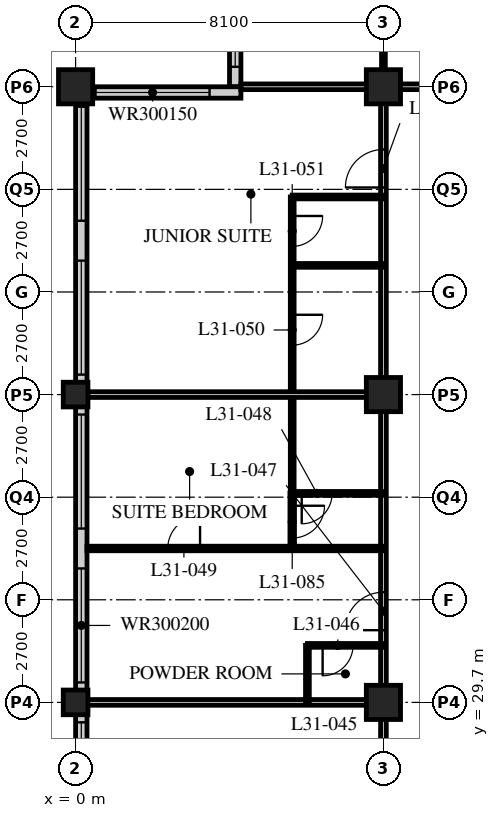
"""IFC4 building model, lengths in metres.
Left out: names, types, materials, properties, quantities, classifications, styles, units other than length and angle.
Written with IfcOpenShell. Run it as: python <this file> out.ifc"""

import sys

from ifc_helpers import new_model, si_unit, direction, frame, frame_2d, origin, origin_2d, place, context, subcontext, project, spatial, rectangle, hollow_rectangle, extrude, element, fill, save


model = new_model("IFC4")
c1 = context("Model", 3, precision=1e-05, world=origin(), true_north=direction((0.0, 1.0)))
c2 = subcontext(c1, "Body", "Model", "MODEL_VIEW")
j1 = project(units=[si_unit("LENGTHUNIT", "METRE"), si_unit("PLANEANGLEUNIT", "RADIAN")], contexts=[c1])
p1 = place(None, origin())
s1 = spatial("IfcSite", under=j1, at=p1, CompositionType="ELEMENT")
p2 = place(p1, origin())
s2 = spatial("IfcBuilding", under=s1, at=p2, CompositionType="ELEMENT")
p3 = place(p2, frame((0.0, 0.0, 123.8)))
s3 = spatial("IfcBuildingStorey", under=s2, at=p3, CompositionType="ELEMENT", Elevation=123.8)
for number, where, z_axis, x_axis in (
    (1, (0.0, 29.7, 0.0), (0.0, 0.0, 1.0), (1.0, 0.0, 0.0)),
    (2, (0.0, 37.8, 0.0), (0.0, 0.0, 1.0), (1.0, 0.0, 0.0)),
):
    element("IfcColumn", number, at=place(p3, frame(where, z_axis=z_axis, x_axis=x_axis)), inside=s3, PredefinedType="COLUMN", context=c2, shape_type="SweptSolid", body=[
        extrude(hollow_rectangle(XDim=0.65, YDim=0.65, WallThickness=0.055, at=origin_2d()), origin(), (0.0, 0.0, 1.0), 3.4),
    ])
for number, where, z_axis, x_axis in (
    (3, (0.0, 45.9, 0.0), (0.0, 0.0, 1.0), (1.0, 0.0, 0.0)),
    (4, (8.1, 29.7, 0.0), (0.0, 0.0, 1.0), (1.0, 0.0, 0.0)),
    (5, (8.1, 37.8, 0.0), (0.0, 0.0, 1.0), (1.0, 0.0, 0.0)),
    (6, (8.1, 45.9, 0.0), (0.0, 0.0, 1.0), (1.0, 0.0, 0.0)),
):
    element("IfcColumn", number, at=place(p3, frame(where, z_axis=z_axis, x_axis=x_axis)), inside=s3, PredefinedType="COLUMN", context=c2, shape_type="SweptSolid", body=[
        extrude(hollow_rectangle(XDim=0.9, YDim=0.9, WallThickness=0.09, at=origin_2d()), origin(), (0.0, 0.0, 1.0), 3.4),
    ])
p4 = place(p3, frame((4.2, 49.65, 0.0), z_axis=(0.0, 0.0, 1.0), x_axis=(0.0, -1.0, 0.0)))
e7 = element("IfcWall", 7, at=p4, inside=s3, PredefinedType="SOLIDWALL", context=c2, shape_type="SweptSolid", body=[
    extrude(rectangle(XDim=3.75, YDim=0.3, at=frame_2d((1.875, 0.0))), origin(), (0.0, 0.0, 1.0), 3.19),
])
p5 = place(p4, frame((0.225, 0.0, 0.9)))
e8 = element("IfcOpeningElement", 8, at=p5, cuts=e7, PredefinedType="OPENING", context=c2, shape_type="SweptSolid", body=[
    extrude(rectangle(XDim=3.0, YDim=1.5, at=frame_2d((1.5, 0.75))), frame((0.0, 0.16, 0.0), z_axis=(0.0, -1.0, 0.0), x_axis=(1.0, 0.0, 0.0)), (0.0, 0.0, 1.0), 0.32),
])
p6 = place(p3, frame((4.35, 45.75, 0.0), z_axis=(0.0, 0.0, 1.0), x_axis=(-1.0, 0.0, 0.0)))
e9 = element("IfcWall", 9, at=p6, inside=s3, PredefinedType="SOLIDWALL", context=c2, shape_type="SweptSolid", body=[
    extrude(rectangle(XDim=4.35, YDim=0.3, at=frame_2d((2.175, 0.0))), origin(), (0.0, 0.0, 1.0), 3.19),
])
p7 = place(p6, frame((0.825, 0.0, 0.9)))
e10 = element("IfcOpeningElement", 10, at=p7, cuts=e9, PredefinedType="OPENING", context=c2, shape_type="SweptSolid", body=[
    extrude(rectangle(XDim=3.0, YDim=1.5, at=frame_2d((1.5, 0.75))), frame((0.0, 0.16, 0.0), z_axis=(0.0, -1.0, 0.0), x_axis=(1.0, 0.0, 0.0)), (0.0, 0.0, 1.0), 0.32),
])
p8 = place(p3, frame((0.15, 45.6, 0.0), z_axis=(0.0, 0.0, 1.0), x_axis=(0.0, -1.0, 0.0)))
e11 = element("IfcWall", 11, at=p8, inside=s3, PredefinedType="SOLIDWALL", context=c2, shape_type="SweptSolid", body=[
    extrude(rectangle(XDim=32.1, YDim=0.3, at=frame_2d((16.05, 0.0))), origin(), (0.0, 0.0, 1.0), 3.19),
])
p9 = place(p8, frame((0.225, 0.0, 0.9)))
e12 = element("IfcOpeningElement", 12, at=p9, cuts=e11, PredefinedType="OPENING", context=c2, shape_type="SweptSolid", body=[
    extrude(rectangle(XDim=3.0, YDim=2.0, at=frame_2d((1.5, 1.0))), frame((0.0, 0.16, 0.0), z_axis=(0.0, -1.0, 0.0), x_axis=(1.0, 0.0, 0.0)), (0.0, 0.0, 1.0), 0.32),
])
p10 = place(p8, frame((4.275, 0.0, 0.9)))
e13 = element("IfcOpeningElement", 13, at=p10, cuts=e11, PredefinedType="OPENING", context=c2, shape_type="SweptSolid", body=[
    extrude(rectangle(XDim=3.0, YDim=2.0, at=frame_2d((1.5, 1.0))), frame((0.0, 0.16, 0.0), z_axis=(0.0, -1.0, 0.0), x_axis=(1.0, 0.0, 0.0)), (0.0, 0.0, 1.0), 0.32),
])
p11 = place(p8, frame((8.325, 0.0, 0.9)))
e14 = element("IfcOpeningElement", 14, at=p11, cuts=e11, PredefinedType="OPENING", context=c2, shape_type="SweptSolid", body=[
    extrude(rectangle(XDim=3.0, YDim=2.0, at=frame_2d((1.5, 1.0))), frame((0.0, 0.16, 0.0), z_axis=(0.0, -1.0, 0.0), x_axis=(1.0, 0.0, 0.0)), (0.0, 0.0, 1.0), 0.32),
])
p12 = place(p8, frame((12.375, 0.0, 0.9)))
e15 = element("IfcOpeningElement", 15, at=p12, cuts=e11, PredefinedType="OPENING", context=c2, shape_type="SweptSolid", body=[
    extrude(rectangle(XDim=3.0, YDim=2.0, at=frame_2d((1.5, 1.0))), frame((0.0, 0.16, 0.0), z_axis=(0.0, -1.0, 0.0), x_axis=(1.0, 0.0, 0.0)), (0.0, 0.0, 1.0), 0.32),
])
p13 = place(p8, frame((16.425, 0.0, 0.9)))
e16 = element("IfcOpeningElement", 16, at=p13, cuts=e11, PredefinedType="OPENING", context=c2, shape_type="SweptSolid", body=[
    extrude(rectangle(XDim=3.0, YDim=2.0, at=frame_2d((1.5, 1.0))), frame((0.0, 0.16, 0.0), z_axis=(0.0, -1.0, 0.0), x_axis=(1.0, 0.0, 0.0)), (0.0, 0.0, 1.0), 0.32),
])
p14 = place(p8, frame((20.475, 0.0, 0.9)))
e17 = element("IfcOpeningElement", 17, at=p14, cuts=e11, PredefinedType="OPENING", context=c2, shape_type="SweptSolid", body=[
    extrude(rectangle(XDim=3.0, YDim=2.0, at=frame_2d((1.5, 1.0))), frame((0.0, 0.16, 0.0), z_axis=(0.0, -1.0, 0.0), x_axis=(1.0, 0.0, 0.0)), (0.0, 0.0, 1.0), 0.32),
])
p15 = place(p8, frame((24.525, 0.0, 0.9)))
e18 = element("IfcOpeningElement", 18, at=p15, cuts=e11, PredefinedType="OPENING", context=c2, shape_type="SweptSolid", body=[
    extrude(rectangle(XDim=3.0, YDim=2.0, at=frame_2d((1.5, 1.0))), frame((0.0, 0.16, 0.0), z_axis=(0.0, -1.0, 0.0), x_axis=(1.0, 0.0, 0.0)), (0.0, 0.0, 1.0), 0.32),
])
p16 = place(p8, frame((28.575, 0.0, 0.9)))
e19 = element("IfcOpeningElement", 19, at=p16, cuts=e11, PredefinedType="OPENING", context=c2, shape_type="SweptSolid", body=[
    extrude(rectangle(XDim=3.0, YDim=2.0, at=frame_2d((1.5, 1.0))), frame((0.0, 0.16, 0.0), z_axis=(0.0, -1.0, 0.0), x_axis=(1.0, 0.0, 0.0)), (0.0, 0.0, 1.0), 0.32),
])
p17 = place(p3, frame((8.1, 45.9, 0.0), z_axis=(0.0, 0.0, 1.0), x_axis=(1.0, 0.0, 0.0)))
e20 = element("IfcWall", 20, at=p17, inside=s3, PredefinedType="PARTITIONING", context=c2, shape_type="SweptSolid", body=[
    extrude(rectangle(XDim=40.5, YDim=0.15, at=frame_2d((20.25, 0.0))), origin(), (0.0, 0.0, 1.0), 2.578),
])
p18 = place(p17, frame((9.625, 0.0, 0.0)))
e21 = element("IfcOpeningElement", 21, at=p18, cuts=e20, PredefinedType="OPENING", context=c2, shape_type="SweptSolid", body=[
    extrude(rectangle(XDim=1.0, YDim=2.1, at=frame_2d((0.5, 1.05))), frame((0.0, 0.085, 0.0), z_axis=(0.0, -1.0, 0.0), x_axis=(1.0, 0.0, 0.0)), (0.0, 0.0, 1.0), 0.17),
])
p19 = place(p17, frame((21.65, 0.0, 0.0)))
e22 = element("IfcOpeningElement", 22, at=p19, cuts=e20, PredefinedType="OPENING", context=c2, shape_type="SweptSolid", body=[
    extrude(rectangle(XDim=1.0, YDim=2.1, at=frame_2d((0.5, 1.05))), frame((0.0, 0.085, 0.0), z_axis=(0.0, -1.0, 0.0), x_axis=(1.0, 0.0, 0.0)), (0.0, 0.0, 1.0), 0.17),
])
p20 = place(p17, frame((26.75, 0.0, 0.0)))
e23 = element("IfcOpeningElement", 23, at=p20, cuts=e20, PredefinedType="OPENING", context=c2, shape_type="SweptSolid", body=[
    extrude(rectangle(XDim=1.0, YDim=2.1, at=frame_2d((0.5, 1.05))), frame((0.0, 0.085, 0.0), z_axis=(0.0, -1.0, 0.0), x_axis=(1.0, 0.0, 0.0)), (0.0, 0.0, 1.0), 0.17),
])
p21 = place(p17, frame((28.95, 0.0, 0.0)))
e24 = element("IfcOpeningElement", 24, at=p21, cuts=e20, PredefinedType="OPENING", context=c2, shape_type="SweptSolid", body=[
    extrude(rectangle(XDim=1.0, YDim=2.1, at=frame_2d((0.5, 1.05))), frame((0.0, 0.085, 0.0), z_axis=(0.0, -1.0, 0.0), x_axis=(1.0, 0.0, 0.0)), (0.0, 0.0, 1.0), 0.17),
])
p22 = place(p17, frame((34.85, 0.0, 0.0)))
e25 = element("IfcOpeningElement", 25, at=p22, cuts=e20, PredefinedType="OPENING", context=c2, shape_type="SweptSolid", body=[
    extrude(rectangle(XDim=1.0, YDim=2.1, at=frame_2d((0.5, 1.05))), frame((0.0, 0.085, 0.0), z_axis=(0.0, -1.0, 0.0), x_axis=(1.0, 0.0, 0.0)), (0.0, 0.0, 1.0), 0.17),
])
p23 = place(p17, frame((36.875, 0.0, 0.0)))
e26 = element("IfcOpeningElement", 26, at=p23, cuts=e20, PredefinedType="OPENING", context=c2, shape_type="SweptSolid", body=[
    extrude(rectangle(XDim=1.0, YDim=2.1, at=frame_2d((0.5, 1.05))), frame((0.0, 0.085, 0.0), z_axis=(0.0, -1.0, 0.0), x_axis=(1.0, 0.0, 0.0)), (0.0, 0.0, 1.0), 0.17),
])
p24 = place(p17, frame((2.625, 0.0, 0.0)))
e27 = element("IfcOpeningElement", 27, at=p24, cuts=e20, PredefinedType="OPENING", context=c2, shape_type="SweptSolid", body=[
    extrude(rectangle(XDim=1.0, YDim=2.1, at=frame_2d((0.5, 1.05))), frame((0.0, 0.085, 0.0), z_axis=(0.0, -1.0, 0.0), x_axis=(1.0, 0.0, 0.0)), (0.0, 0.0, 1.0), 0.17),
])
p25 = place(p3, frame((8.1, 21.6, 0.0), z_axis=(0.0, 0.0, 1.0), x_axis=(0.0, 1.0, 0.0)))
e28 = element("IfcWall", 28, at=p25, inside=s3, PredefinedType="PARTITIONING", context=c2, shape_type="SweptSolid", body=[
    extrude(rectangle(XDim=24.3, YDim=0.15, at=frame_2d((12.15, 0.0))), origin(), (0.0, 0.0, 1.0), 2.578),
])
p26 = place(p25, frame((5.45, 0.0, 0.0)))
e29 = element("IfcOpeningElement", 29, at=p26, cuts=e28, PredefinedType="OPENING", context=c2, shape_type="SweptSolid", body=[
    extrude(rectangle(XDim=1.0, YDim=2.1, at=frame_2d((0.5, 1.05))), frame((0.0, 0.085, 0.0), z_axis=(0.0, -1.0, 0.0), x_axis=(1.0, 0.0, 0.0)), (0.0, 0.0, 1.0), 0.17),
])
p27 = place(p25, frame((10.0, 0.0, 0.0)))
e30 = element("IfcOpeningElement", 30, at=p27, cuts=e28, PredefinedType="OPENING", context=c2, shape_type="SweptSolid", body=[
    extrude(rectangle(XDim=1.0, YDim=2.1, at=frame_2d((0.5, 1.05))), frame((0.0, 0.085, 0.0), z_axis=(0.0, -1.0, 0.0), x_axis=(1.0, 0.0, 0.0)), (0.0, 0.0, 1.0), 0.17),
])
p28 = place(p25, frame((21.65, 0.0, 0.0)))
e31 = element("IfcOpeningElement", 31, at=p28, cuts=e28, PredefinedType="OPENING", context=c2, shape_type="SweptSolid", body=[
    extrude(rectangle(XDim=1.0, YDim=2.1, at=frame_2d((0.5, 1.05))), frame((0.0, 0.085, 0.0), z_axis=(0.0, -1.0, 0.0), x_axis=(1.0, 0.0, 0.0)), (0.0, 0.0, 1.0), 0.17),
])
p29 = place(p3, frame((8.1, 29.7, 0.0), z_axis=(0.0, 0.0, 1.0), x_axis=(-1.0, 0.0, 0.0)))
e32 = element("IfcWall", 32, at=p29, inside=s3, PredefinedType="PARTITIONING", context=c2, shape_type="SweptSolid", body=[
    extrude(rectangle(XDim=7.8, YDim=0.15, at=frame_2d((3.9, 0.0))), origin(), (0.0, 0.0, 1.0), 2.578),
])
p30 = place(p3, frame((6.1, 29.7, 0.0), z_axis=(0.0, 0.0, 1.0), x_axis=(0.0, 1.0, 0.0)))
e33 = element("IfcWall", 33, at=p30, inside=s3, PredefinedType="PARTITIONING", context=c2, shape_type="SweptSolid", body=[
    extrude(rectangle(XDim=1.5, YDim=0.1, at=frame_2d((0.75, 0.0))), origin(), (0.0, 0.0, 1.0), 3.19),
])
p31 = place(p3, frame((8.1, 31.2, 0.0), z_axis=(0.0, 0.0, 1.0), x_axis=(-1.0, 0.0, 0.0)))
e34 = element("IfcWall", 34, at=p31, inside=s3, PredefinedType="PARTITIONING", context=c2, shape_type="SweptSolid", body=[
    extrude(rectangle(XDim=2.0, YDim=0.1, at=frame_2d((1.0, 0.0))), origin(), (0.0, 0.0, 1.0), 3.19),
])
p32 = place(p31, frame((0.8, 0.0, 0.0)))
e35 = element("IfcOpeningElement", 35, at=p32, cuts=e34, PredefinedType="OPENING", context=c2, shape_type="SweptSolid", body=[
    extrude(rectangle(XDim=0.8, YDim=2.1, at=frame_2d((0.4, 1.05))), frame((0.0, 0.06, 0.0), z_axis=(0.0, -1.0, 0.0), x_axis=(1.0, 0.0, 0.0)), (0.0, 0.0, 1.0), 0.12),
])
p33 = place(p3, frame((5.7, 35.2, 0.0), z_axis=(0.0, 0.0, 1.0), x_axis=(0.0, 1.0, 0.0)))
e36 = element("IfcWall", 36, at=p33, inside=s3, PredefinedType="PARTITIONING", context=c2, shape_type="SweptSolid", body=[
    extrude(rectangle(XDim=7.8, YDim=0.1, at=frame_2d((3.9, 0.0))), origin(), (0.0, 0.0, 1.0), 3.19),
])
p34 = place(p33, frame((3.9, 0.0, 0.0)))
e37 = element("IfcOpeningElement", 37, at=p34, cuts=e36, PredefinedType="OPENING", context=c2, shape_type="SweptSolid", body=[
    extrude(rectangle(XDim=0.8, YDim=2.1, at=frame_2d((0.4, 1.05))), frame((0.0, 0.06, 0.0), z_axis=(0.0, -1.0, 0.0), x_axis=(1.0, 0.0, 0.0)), (0.0, 0.0, 1.0), 0.12),
])
p35 = place(p33, frame((6.5, 0.0, 0.0)))
e38 = element("IfcOpeningElement", 38, at=p35, cuts=e36, PredefinedType="OPENING", context=c2, shape_type="SweptSolid", body=[
    extrude(rectangle(XDim=0.8, YDim=2.1, at=frame_2d((0.4, 1.05))), frame((0.0, 0.06, 0.0), z_axis=(0.0, -1.0, 0.0), x_axis=(1.0, 0.0, 0.0)), (0.0, 0.0, 1.0), 0.12),
])
p36 = place(p3, frame((8.1, 35.2, 0.0), z_axis=(0.0, 0.0, 1.0), x_axis=(-1.0, 0.0, 0.0)))
e39 = element("IfcWall", 39, at=p36, inside=s3, PredefinedType="PARTITIONING", context=c2, shape_type="SweptSolid", body=[
    extrude(rectangle(XDim=2.4, YDim=0.1, at=frame_2d((1.2, 0.0))), origin(), (0.0, 0.0, 1.0), 3.19),
])
p37 = place(p36, frame((1.35, 0.0, 0.0)))
e40 = element("IfcOpeningElement", 40, at=p37, cuts=e39, PredefinedType="OPENING", context=c2, shape_type="SweptSolid", body=[
    extrude(rectangle(XDim=0.8, YDim=2.1, at=frame_2d((0.4, 1.05))), frame((0.0, 0.06, 0.0), z_axis=(0.0, -1.0, 0.0), x_axis=(1.0, 0.0, 0.0)), (0.0, 0.0, 1.0), 0.12),
])
p38 = place(p3, frame((8.1, 33.75, 0.0), z_axis=(0.0, 0.0, 1.0), x_axis=(-1.0, 0.0, 0.0)))
e41 = element("IfcWall", 41, at=p38, inside=s3, PredefinedType="PARTITIONING", context=c2, shape_type="SweptSolid", body=[
    extrude(rectangle(XDim=7.8, YDim=0.12, at=frame_2d((3.9, 0.0))), origin(), (0.0, 0.0, 1.0), 3.19),
])
p39 = place(p38, frame((4.825, 0.0, 0.0)))
e42 = element("IfcOpeningElement", 42, at=p39, cuts=e41, PredefinedType="OPENING", context=c2, shape_type="SweptSolid", body=[
    extrude(rectangle(XDim=0.85, YDim=2.1, at=frame_2d((0.425, 1.05))), frame((0.0, 0.07, 0.0), z_axis=(0.0, -1.0, 0.0), x_axis=(1.0, 0.0, 0.0)), (0.0, 0.0, 1.0), 0.14),
])
p40 = place(p3, frame((8.1, 37.8, 0.0), z_axis=(0.0, 0.0, 1.0), x_axis=(-1.0, 0.0, 0.0)))
e43 = element("IfcWall", 43, at=p40, inside=s3, PredefinedType="PARTITIONING", context=c2, shape_type="SweptSolid", body=[
    extrude(rectangle(XDim=7.8, YDim=0.15, at=frame_2d((3.9, 0.0))), origin(), (0.0, 0.0, 1.0), 2.578),
])
for number, where, z_axis, x_axis in (
    (44, (8.1, 41.2, 0.0), (0.0, 0.0, 1.0), (-1.0, 0.0, 0.0)),
    (45, (8.1, 43.0, 0.0), (0.0, 0.0, 1.0), (-1.0, 0.0, 0.0)),
):
    element("IfcWall", number, at=place(p3, frame(where, z_axis=z_axis, x_axis=x_axis)), inside=s3, PredefinedType="PARTITIONING", context=c2, shape_type="SweptSolid", body=[
        extrude(rectangle(XDim=2.4, YDim=0.1, at=frame_2d((1.2, 0.0))), origin(), (0.0, 0.0, 1.0), 3.19),
    ])
p41 = place(p3, frame((8.1, 45.9, 0.0), z_axis=(0.0, 0.0, 1.0), x_axis=(0.0, 1.0, 0.0)))
e46 = element("IfcWall", 46, at=p41, inside=s3, PredefinedType="PARTITIONING", context=c2, shape_type="SweptSolid", body=[
    extrude(rectangle(XDim=2.4, YDim=0.1, at=frame_2d((1.2, 0.0))), origin(), (0.0, 0.0, 1.0), 2.578),
])
p42 = place(p3, frame((4.35, 45.9, 0.0), z_axis=(0.0, 0.0, 1.0), x_axis=(1.0, 0.0, 0.0)))
e47 = element("IfcWall", 47, at=p42, inside=s3, PredefinedType="PARTITIONING", context=c2, shape_type="SweptSolid", body=[
    extrude(rectangle(XDim=3.75, YDim=0.15, at=frame_2d((1.875, 0.0))), origin(), (0.0, 0.0, 1.0), 2.578),
])
p43 = place(p3, frame((5.7, 33.75, 0.0), z_axis=(0.0, 0.0, 1.0), x_axis=(0.0, 1.0, 0.0)))
e48 = element("IfcWall", 48, at=p43, inside=s3, PredefinedType="PARTITIONING", context=c2, shape_type="SweptSolid", body=[
    extrude(rectangle(XDim=1.46, YDim=0.12, at=frame_2d((0.73, 0.0))), origin(), (0.0, 0.0, 1.0), 3.19),
])
p44 = place(p43, frame((0.275, 0.0, 0.0)))
e49 = element("IfcOpeningElement", 49, at=p44, cuts=e48, PredefinedType="OPENING", context=c2, shape_type="SweptSolid", body=[
    extrude(rectangle(XDim=0.85, YDim=2.1, at=frame_2d((0.425, 1.05))), frame((0.0, 0.07, 0.0), z_axis=(0.0, -1.0, 0.0), x_axis=(1.0, 0.0, 0.0)), (0.0, 0.0, 1.0), 0.14),
])
p45 = place(p5, origin())
e50 = element("IfcWindow", 50, at=p45, inside=s3, PartitioningType="SINGLE_PANEL", PredefinedType="WINDOW", context=c2, shape_type="SweptSolid", body=[
    extrude(rectangle(XDim=3.0, YDim=1.5, at=frame_2d((1.5, 0.75))), frame((0.0, 0.03, 0.0), z_axis=(0.0, -1.0, 0.0), x_axis=(1.0, 0.0, 0.0)), (0.0, 0.0, 1.0), 0.06),
])
fill(e8, e50)
p46 = place(p7, origin())
e51 = element("IfcWindow", 51, at=p46, inside=s3, PartitioningType="SINGLE_PANEL", PredefinedType="WINDOW", context=c2, shape_type="SweptSolid", body=[
    extrude(rectangle(XDim=3.0, YDim=1.5, at=frame_2d((1.5, 0.75))), frame((0.0, 0.03, 0.0), z_axis=(0.0, -1.0, 0.0), x_axis=(1.0, 0.0, 0.0)), (0.0, 0.0, 1.0), 0.06),
])
fill(e10, e51)
p47 = place(p9, origin())
e52 = element("IfcWindow", 52, at=p47, inside=s3, PartitioningType="SINGLE_PANEL", PredefinedType="WINDOW", context=c2, shape_type="SweptSolid", body=[
    extrude(rectangle(XDim=3.0, YDim=2.0, at=frame_2d((1.5, 1.0))), frame((0.0, 0.03, 0.0), z_axis=(0.0, -1.0, 0.0), x_axis=(1.0, 0.0, 0.0)), (0.0, 0.0, 1.0), 0.06),
])
fill(e12, e52)
p48 = place(p10, origin())
e53 = element("IfcWindow", 53, at=p48, inside=s3, PartitioningType="SINGLE_PANEL", PredefinedType="WINDOW", context=c2, shape_type="SweptSolid", body=[
    extrude(rectangle(XDim=3.0, YDim=2.0, at=frame_2d((1.5, 1.0))), frame((0.0, 0.03, 0.0), z_axis=(0.0, -1.0, 0.0), x_axis=(1.0, 0.0, 0.0)), (0.0, 0.0, 1.0), 0.06),
])
fill(e13, e53)
p49 = place(p11, origin())
e54 = element("IfcWindow", 54, at=p49, inside=s3, PartitioningType="SINGLE_PANEL", PredefinedType="WINDOW", context=c2, shape_type="SweptSolid", body=[
    extrude(rectangle(XDim=3.0, YDim=2.0, at=frame_2d((1.5, 1.0))), frame((0.0, 0.03, 0.0), z_axis=(0.0, -1.0, 0.0), x_axis=(1.0, 0.0, 0.0)), (0.0, 0.0, 1.0), 0.06),
])
fill(e14, e54)
p50 = place(p12, origin())
e55 = element("IfcWindow", 55, at=p50, inside=s3, PartitioningType="SINGLE_PANEL", PredefinedType="WINDOW", context=c2, shape_type="SweptSolid", body=[
    extrude(rectangle(XDim=3.0, YDim=2.0, at=frame_2d((1.5, 1.0))), frame((0.0, 0.03, 0.0), z_axis=(0.0, -1.0, 0.0), x_axis=(1.0, 0.0, 0.0)), (0.0, 0.0, 1.0), 0.06),
])
fill(e15, e55)
p51 = place(p13, origin())
e56 = element("IfcWindow", 56, at=p51, inside=s3, PartitioningType="SINGLE_PANEL", PredefinedType="WINDOW", context=c2, shape_type="SweptSolid", body=[
    extrude(rectangle(XDim=3.0, YDim=2.0, at=frame_2d((1.5, 1.0))), frame((0.0, 0.03, 0.0), z_axis=(0.0, -1.0, 0.0), x_axis=(1.0, 0.0, 0.0)), (0.0, 0.0, 1.0), 0.06),
])
fill(e16, e56)
p52 = place(p32, origin())
e57 = element("IfcDoor", 57, at=p52, inside=s3, OperationType="SINGLE_SWING_RIGHT", PredefinedType="DOOR", context=c2, shape_type="SweptSolid", body=[
    extrude(rectangle(XDim=0.8, YDim=2.1, at=frame_2d((0.4, 1.05))), frame((0.0, 0.025, 0.0), z_axis=(0.0, -1.0, 0.0), x_axis=(1.0, 0.0, 0.0)), (0.0, 0.0, 1.0), 0.05),
])
fill(e35, e57)
p53 = place(p27, origin())
e58 = element("IfcDoor", 58, at=p53, inside=s3, OperationType="SINGLE_SWING_LEFT", PredefinedType="DOOR", context=c2, shape_type="SweptSolid", body=[
    extrude(rectangle(XDim=1.0, YDim=2.1, at=frame_2d((0.5, 1.05))), frame((0.0, 0.025, 0.0), z_axis=(0.0, -1.0, 0.0), x_axis=(1.0, 0.0, 0.0)), (0.0, 0.0, 1.0), 0.05),
])
fill(e30, e58)
p54 = place(p37, origin())
e59 = element("IfcDoor", 59, at=p54, inside=s3, OperationType="SINGLE_SWING_RIGHT", PredefinedType="DOOR", context=c2, shape_type="SweptSolid", body=[
    extrude(rectangle(XDim=0.8, YDim=2.1, at=frame_2d((0.4, 1.05))), frame((0.0, 0.025, 0.0), z_axis=(0.0, -1.0, 0.0), x_axis=(1.0, 0.0, 0.0)), (0.0, 0.0, 1.0), 0.05),
])
fill(e40, e59)
p55 = place(p39, origin())
e60 = element("IfcDoor", 60, at=p55, inside=s3, OperationType="SINGLE_SWING_RIGHT", PredefinedType="DOOR", context=c2, shape_type="SweptSolid", body=[
    extrude(rectangle(XDim=0.85, YDim=2.1, at=frame_2d((0.425, 1.05))), frame((0.0, 0.025, 0.0), z_axis=(0.0, -1.0, 0.0), x_axis=(1.0, 0.0, 0.0)), (0.0, 0.0, 1.0), 0.05),
])
fill(e42, e60)
p56 = place(p34, origin())
e61 = element("IfcDoor", 61, at=p56, inside=s3, OperationType="SINGLE_SWING_LEFT", PredefinedType="DOOR", context=c2, shape_type="SweptSolid", body=[
    extrude(rectangle(XDim=0.8, YDim=2.1, at=frame_2d((0.4, 1.05))), frame((0.0, 0.025, 0.0), z_axis=(0.0, -1.0, 0.0), x_axis=(1.0, 0.0, 0.0)), (0.0, 0.0, 1.0), 0.05),
])
fill(e37, e61)
p57 = place(p35, origin())
e62 = element("IfcDoor", 62, at=p57, inside=s3, OperationType="SINGLE_SWING_LEFT", PredefinedType="DOOR", context=c2, shape_type="SweptSolid", body=[
    extrude(rectangle(XDim=0.8, YDim=2.1, at=frame_2d((0.4, 1.05))), frame((0.0, 0.025, 0.0), z_axis=(0.0, -1.0, 0.0), x_axis=(1.0, 0.0, 0.0)), (0.0, 0.0, 1.0), 0.05),
])
fill(e38, e62)
p58 = place(p28, origin())
e63 = element("IfcDoor", 63, at=p58, inside=s3, OperationType="SINGLE_SWING_LEFT", PredefinedType="DOOR", context=c2, shape_type="SweptSolid", body=[
    extrude(rectangle(XDim=1.0, YDim=2.1, at=frame_2d((0.5, 1.05))), frame((0.0, 0.025, 0.0), z_axis=(0.0, -1.0, 0.0), x_axis=(1.0, 0.0, 0.0)), (0.0, 0.0, 1.0), 0.05),
])
fill(e31, e63)
p59 = place(p44, origin())
e64 = element("IfcDoor", 64, at=p59, inside=s3, OperationType="SINGLE_SWING_LEFT", PredefinedType="DOOR", context=c2, shape_type="SweptSolid", body=[
    extrude(rectangle(XDim=0.85, YDim=2.1, at=frame_2d((0.425, 1.05))), frame((0.0, 0.025, 0.0), z_axis=(0.0, -1.0, 0.0), x_axis=(1.0, 0.0, 0.0)), (0.0, 0.0, 1.0), 0.05),
])
fill(e49, e64)
save(model, sys.argv[1])
